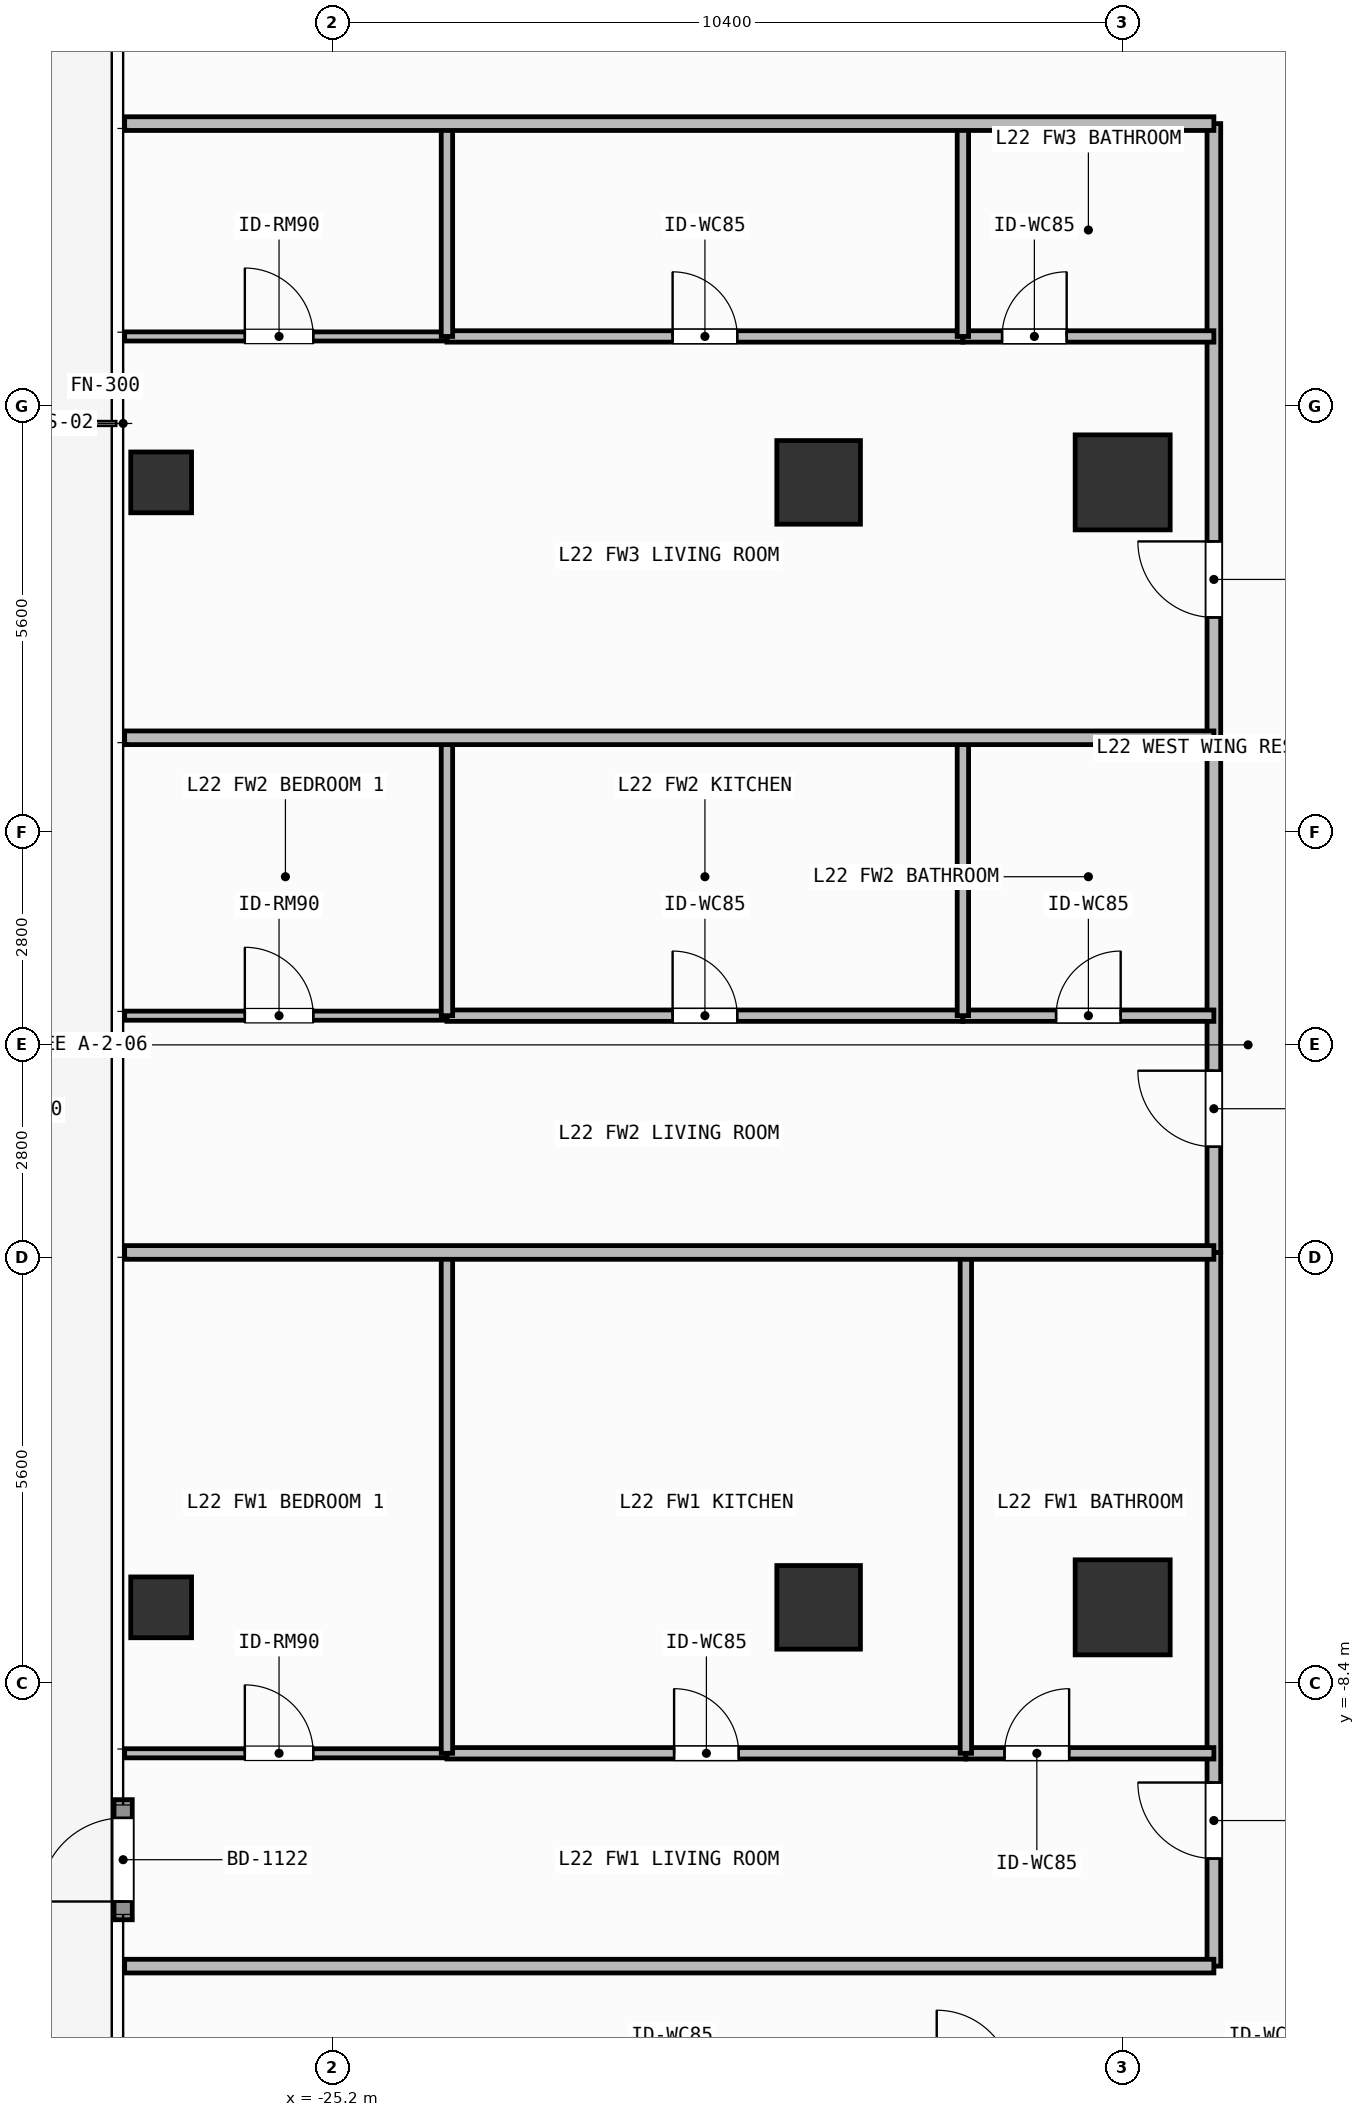
"""IFC4 building model, lengths in metres.
Left out: names, types, materials, properties, quantities, classifications, styles, units other than length and angle.
Written with IfcOpenShell. Run it as: python <this file> out.ifc"""

import sys

from ifc_helpers import new_model, si_unit, direction, frame, frame_2d, origin, origin_2d, place, context, subcontext, project, spatial, rectangle, hollow_rectangle, extrude, element, fill, save


model = new_model("IFC4")
c1 = context("Model", 3, precision=1e-05, world=origin(), true_north=direction((0.0, 1.0)))
c2 = subcontext(c1, "Body", "Model", "MODEL_VIEW")
j1 = project(units=[si_unit("LENGTHUNIT", "METRE"), si_unit("PLANEANGLEUNIT", "RADIAN")], contexts=[c1])
p1 = place(None, origin())
s1 = spatial("IfcSite", under=j1, at=p1, CompositionType="ELEMENT")
p2 = place(p1, origin())
s2 = spatial("IfcBuilding", under=s1, at=p2, CompositionType="ELEMENT")
p3 = place(p2, frame((0.0, 0.0, 89.1)))
s3 = spatial("IfcBuildingStorey", under=s2, at=p3, CompositionType="ELEMENT", Elevation=89.1)
for number, where, z_axis, x_axis in (
    (1, (-14.8, -7.4, 0.0), (0.0, 0.0, 1.0), (1.0, 0.0, 0.0)),
    (2, (-14.8, 7.4, 0.0), (0.0, 0.0, 1.0), (1.0, 0.0, 0.0)),
):
    element("IfcColumn", number, at=place(p3, frame(where, z_axis=z_axis, x_axis=x_axis)), inside=s3, PredefinedType="COLUMN", context=c2, shape_type="SweptSolid", body=[
        extrude(rectangle(XDim=1.25, YDim=1.25, at=origin_2d()), origin(), (0.0, 0.0, 1.0), 3.9),
    ])
for number, where, z_axis, x_axis in (
    (3, (-18.8, -7.4, 0.0), (0.0, 0.0, 1.0), (1.0, 0.0, 0.0)),
    (4, (-18.8, 7.4, 0.0), (0.0, 0.0, 1.0), (1.0, 0.0, 0.0)),
):
    element("IfcColumn", number, at=place(p3, frame(where, z_axis=z_axis, x_axis=x_axis)), inside=s3, PredefinedType="COLUMN", context=c2, shape_type="SweptSolid", body=[
        extrude(rectangle(XDim=1.1, YDim=1.1, at=origin_2d()), origin(), (0.0, 0.0, 1.0), 3.9),
    ])
for number, where, z_axis, x_axis in (
    (5, (-27.45, -7.4, 0.0), (0.0, 0.0, 1.0), (1.0, 0.0, 0.0)),
    (6, (-27.45, 7.4, 0.0), (0.0, 0.0, 1.0), (1.0, 0.0, 0.0)),
):
    element("IfcColumn", number, at=place(p3, frame(where, z_axis=z_axis, x_axis=x_axis)), inside=s3, PredefinedType="COLUMN", context=c2, shape_type="SweptSolid", body=[
        extrude(hollow_rectangle(XDim=0.8, YDim=0.8, WallThickness=0.036, at=origin_2d()), origin(), (0.0, 0.0, 1.0), 3.9),
    ])
p4 = place(p3, frame((-27.95, -11.51, 0.0), z_axis=(0.0, 0.0, 1.0), x_axis=(0.0, 1.0, 0.0)))
e7 = element("IfcWall", 7, at=p4, inside=s3, PredefinedType="SOLIDWALL", context=c2, shape_type="SweptSolid", body=[
    extrude(rectangle(XDim=1.58, YDim=0.24, at=frame_2d((0.79, 0.0))), origin(), (0.0, 0.0, 1.0), 3.68),
])
p5 = place(p4, frame((0.24, 0.0, 0.0)))
e8 = element("IfcOpeningElement", 8, at=p5, cuts=e7, PredefinedType="OPENING", context=c2, shape_type="SweptSolid", body=[
    extrude(rectangle(XDim=1.1, YDim=2.2, at=frame_2d((0.55, 1.1))), frame((0.0, 0.13, 0.0), z_axis=(0.0, -1.0, 0.0), x_axis=(1.0, 0.0, 0.0)), (0.0, 0.0, 1.0), 0.26),
])
p6 = place(p3, frame((-13.6, -12.12, 0.0), z_axis=(0.0, 0.0, 1.0), x_axis=(0.0, 1.0, 0.0)))
e9 = element("IfcWall", 9, at=p6, inside=s3, PredefinedType="PARTITIONING", context=c2, shape_type="SweptSolid", body=[
    extrude(rectangle(XDim=9.389, YDim=0.18, at=frame_2d((4.695, 0.0))), origin(), (0.0, 0.0, 1.0), 3.68),
])
p7 = place(p6, frame((1.415, 0.0, 0.0)))
e10 = element("IfcOpeningElement", 10, at=p7, cuts=e9, PredefinedType="OPENING", context=c2, shape_type="SweptSolid", body=[
    extrude(rectangle(XDim=1.0, YDim=2.2, at=frame_2d((0.5, 1.1))), frame((0.0, 0.1, 0.0), z_axis=(0.0, -1.0, 0.0), x_axis=(1.0, 0.0, 0.0)), (0.0, 0.0, 1.0), 0.2),
])
p8 = place(p3, frame((-23.69, -9.32, 0.0), z_axis=(0.0, 0.0, 1.0), x_axis=(1.0, 0.0, 0.0)))
e11 = element("IfcWall", 11, at=p8, inside=s3, PredefinedType="PARTITIONING", context=c2, shape_type="SweptSolid", body=[
    extrude(rectangle(XDim=6.827, YDim=0.15, at=frame_2d((3.414, 0.0))), origin(), (0.0, 0.0, 1.0), 3.68),
])
p9 = place(p8, frame((2.989, 0.0, 0.0)))
e12 = element("IfcOpeningElement", 12, at=p9, cuts=e11, PredefinedType="OPENING", context=c2, shape_type="SweptSolid", body=[
    extrude(rectangle(XDim=0.85, YDim=2.1, at=frame_2d((0.425, 1.05))), frame((0.0, 0.085, 0.0), z_axis=(0.0, -1.0, 0.0), x_axis=(1.0, 0.0, 0.0)), (0.0, 0.0, 1.0), 0.17),
])
p10 = place(p3, frame((-16.863, -9.32, 0.0), z_axis=(0.0, 0.0, 1.0), x_axis=(1.0, 0.0, 0.0)))
e13 = element("IfcWall", 13, at=p10, inside=s3, PredefinedType="PARTITIONING", context=c2, shape_type="SweptSolid", body=[
    extrude(rectangle(XDim=3.263, YDim=0.15, at=frame_2d((1.631, 0.0))), origin(), (0.0, 0.0, 1.0), 3.68),
])
p11 = place(p10, frame((0.509, 0.0, 0.0)))
e14 = element("IfcOpeningElement", 14, at=p11, cuts=e13, PredefinedType="OPENING", context=c2, shape_type="SweptSolid", body=[
    extrude(rectangle(XDim=0.85, YDim=2.1, at=frame_2d((0.425, 1.05))), frame((0.0, 0.085, 0.0), z_axis=(0.0, -1.0, 0.0), x_axis=(1.0, 0.0, 0.0)), (0.0, 0.0, 1.0), 0.17),
])
p12 = place(p3, frame((-27.93, -9.32, 0.0), z_axis=(0.0, 0.0, 1.0), x_axis=(1.0, 0.0, 0.0)))
e15 = element("IfcWall", 15, at=p12, inside=s3, PredefinedType="PARTITIONING", context=c2, shape_type="SweptSolid", body=[
    extrude(rectangle(XDim=4.24, YDim=0.12, at=frame_2d((2.12, 0.0))), origin(), (0.0, 0.0, 1.0), 3.68),
])
p13 = place(p12, frame((1.581, 0.0, 0.0)))
e16 = element("IfcOpeningElement", 16, at=p13, cuts=e15, PredefinedType="OPENING", context=c2, shape_type="SweptSolid", body=[
    extrude(rectangle(XDim=0.9, YDim=2.1, at=frame_2d((0.45, 1.05))), frame((0.0, 0.07, 0.0), z_axis=(0.0, -1.0, 0.0), x_axis=(1.0, 0.0, 0.0)), (0.0, 0.0, 1.0), 0.14),
])
p14 = place(p3, frame((-13.6, -2.731, 0.0), z_axis=(0.0, 0.0, 1.0), x_axis=(0.0, 1.0, 0.0)))
e17 = element("IfcWall", 17, at=p14, inside=s3, PredefinedType="PARTITIONING", context=c2, shape_type="SweptSolid", body=[
    extrude(rectangle(XDim=6.771, YDim=0.18, at=frame_2d((3.385, 0.0))), origin(), (0.0, 0.0, 1.0), 3.68),
])
p15 = place(p14, frame((1.391, 0.0, 0.0)))
e18 = element("IfcOpeningElement", 18, at=p15, cuts=e17, PredefinedType="OPENING", context=c2, shape_type="SweptSolid", body=[
    extrude(rectangle(XDim=1.0, YDim=2.2, at=frame_2d((0.5, 1.1))), frame((0.0, 0.1, 0.0), z_axis=(0.0, -1.0, 0.0), x_axis=(1.0, 0.0, 0.0)), (0.0, 0.0, 1.0), 0.2),
])
p16 = place(p3, frame((-23.69, 0.384, 0.0), z_axis=(0.0, 0.0, 1.0), x_axis=(1.0, 0.0, 0.0)))
e19 = element("IfcWall", 19, at=p16, inside=s3, PredefinedType="PARTITIONING", context=c2, shape_type="SweptSolid", body=[
    extrude(rectangle(XDim=6.788, YDim=0.15, at=frame_2d((3.394, 0.0))), origin(), (0.0, 0.0, 1.0), 3.68),
])
p17 = place(p16, frame((2.969, 0.0, 0.0)))
e20 = element("IfcOpeningElement", 20, at=p17, cuts=e19, PredefinedType="OPENING", context=c2, shape_type="SweptSolid", body=[
    extrude(rectangle(XDim=0.85, YDim=2.1, at=frame_2d((0.425, 1.05))), frame((0.0, 0.085, 0.0), z_axis=(0.0, -1.0, 0.0), x_axis=(1.0, 0.0, 0.0)), (0.0, 0.0, 1.0), 0.17),
])
p18 = place(p3, frame((-16.902, 0.384, 0.0), z_axis=(0.0, 0.0, 1.0), x_axis=(1.0, 0.0, 0.0)))
e21 = element("IfcWall", 21, at=p18, inside=s3, PredefinedType="PARTITIONING", context=c2, shape_type="SweptSolid", body=[
    extrude(rectangle(XDim=3.302, YDim=0.15, at=frame_2d((1.651, 0.0))), origin(), (0.0, 0.0, 1.0), 3.68),
])
p19 = place(p18, frame((1.226, 0.0, 0.0)))
e22 = element("IfcOpeningElement", 22, at=p19, cuts=e21, PredefinedType="OPENING", context=c2, shape_type="SweptSolid", body=[
    extrude(rectangle(XDim=0.85, YDim=2.1, at=frame_2d((0.425, 1.05))), frame((0.0, 0.085, 0.0), z_axis=(0.0, -1.0, 0.0), x_axis=(1.0, 0.0, 0.0)), (0.0, 0.0, 1.0), 0.17),
])
p20 = place(p3, frame((-27.93, 0.384, 0.0), z_axis=(0.0, 0.0, 1.0), x_axis=(1.0, 0.0, 0.0)))
e23 = element("IfcWall", 23, at=p20, inside=s3, PredefinedType="PARTITIONING", context=c2, shape_type="SweptSolid", body=[
    extrude(rectangle(XDim=4.24, YDim=0.12, at=frame_2d((2.12, 0.0))), origin(), (0.0, 0.0, 1.0), 3.68),
])
p21 = place(p20, frame((1.581, 0.0, 0.0)))
e24 = element("IfcOpeningElement", 24, at=p21, cuts=e23, PredefinedType="OPENING", context=c2, shape_type="SweptSolid", body=[
    extrude(rectangle(XDim=0.9, YDim=2.1, at=frame_2d((0.45, 1.05))), frame((0.0, 0.07, 0.0), z_axis=(0.0, -1.0, 0.0), x_axis=(1.0, 0.0, 0.0)), (0.0, 0.0, 1.0), 0.14),
])
p22 = place(p3, frame((-13.6, 4.04, 0.0), z_axis=(0.0, 0.0, 1.0), x_axis=(0.0, 1.0, 0.0)))
e25 = element("IfcWall", 25, at=p22, inside=s3, PredefinedType="PARTITIONING", context=c2, shape_type="SweptSolid", body=[
    extrude(rectangle(XDim=8.08, YDim=0.18, at=frame_2d((4.04, 0.0))), origin(), (0.0, 0.0, 1.0), 3.68),
])
p23 = place(p22, frame((1.583, 0.0, 0.0)))
e26 = element("IfcOpeningElement", 26, at=p23, cuts=e25, PredefinedType="OPENING", context=c2, shape_type="SweptSolid", body=[
    extrude(rectangle(XDim=1.0, YDim=2.2, at=frame_2d((0.5, 1.1))), frame((0.0, 0.1, 0.0), z_axis=(0.0, -1.0, 0.0), x_axis=(1.0, 0.0, 0.0)), (0.0, 0.0, 1.0), 0.2),
])
p24 = place(p3, frame((-23.69, 9.32, 0.0), z_axis=(0.0, 0.0, 1.0), x_axis=(1.0, 0.0, 0.0)))
e27 = element("IfcWall", 27, at=p24, inside=s3, PredefinedType="PARTITIONING", context=c2, shape_type="SweptSolid", body=[
    extrude(rectangle(XDim=6.788, YDim=0.15, at=frame_2d((3.394, 0.0))), origin(), (0.0, 0.0, 1.0), 3.68),
])
p25 = place(p24, frame((2.969, 0.0, 0.0)))
e28 = element("IfcOpeningElement", 28, at=p25, cuts=e27, PredefinedType="OPENING", context=c2, shape_type="SweptSolid", body=[
    extrude(rectangle(XDim=0.85, YDim=2.1, at=frame_2d((0.425, 1.05))), frame((0.0, 0.085, 0.0), z_axis=(0.0, -1.0, 0.0), x_axis=(1.0, 0.0, 0.0)), (0.0, 0.0, 1.0), 0.17),
])
p26 = place(p3, frame((-16.902, 9.32, 0.0), z_axis=(0.0, 0.0, 1.0), x_axis=(1.0, 0.0, 0.0)))
e29 = element("IfcWall", 29, at=p26, inside=s3, PredefinedType="PARTITIONING", context=c2, shape_type="SweptSolid", body=[
    extrude(rectangle(XDim=3.302, YDim=0.15, at=frame_2d((1.651, 0.0))), origin(), (0.0, 0.0, 1.0), 3.68),
])
p27 = place(p26, frame((0.515, 0.0, 0.0)))
e30 = element("IfcOpeningElement", 30, at=p27, cuts=e29, PredefinedType="OPENING", context=c2, shape_type="SweptSolid", body=[
    extrude(rectangle(XDim=0.85, YDim=2.1, at=frame_2d((0.425, 1.05))), frame((0.0, 0.085, 0.0), z_axis=(0.0, -1.0, 0.0), x_axis=(1.0, 0.0, 0.0)), (0.0, 0.0, 1.0), 0.17),
])
p28 = place(p3, frame((-27.93, 9.32, 0.0), z_axis=(0.0, 0.0, 1.0), x_axis=(1.0, 0.0, 0.0)))
e31 = element("IfcWall", 31, at=p28, inside=s3, PredefinedType="PARTITIONING", context=c2, shape_type="SweptSolid", body=[
    extrude(rectangle(XDim=4.24, YDim=0.12, at=frame_2d((2.12, 0.0))), origin(), (0.0, 0.0, 1.0), 3.68),
])
p29 = place(p28, frame((1.581, 0.0, 0.0)))
e32 = element("IfcOpeningElement", 32, at=p29, cuts=e31, PredefinedType="OPENING", context=c2, shape_type="SweptSolid", body=[
    extrude(rectangle(XDim=0.9, YDim=2.1, at=frame_2d((0.45, 1.05))), frame((0.0, 0.07, 0.0), z_axis=(0.0, -1.0, 0.0), x_axis=(1.0, 0.0, 0.0)), (0.0, 0.0, 1.0), 0.14),
])
for number, where, z_axis, x_axis in (
    (33, (-16.863, -9.32, 0.0), (0.0, 0.0, 1.0), (0.0, 1.0, 0.0)),
    (34, (-23.69, -9.32, 0.0), (0.0, 0.0, 1.0), (0.0, 1.0, 0.0)),
):
    element("IfcWall", number, at=place(p3, frame(where, z_axis=z_axis, x_axis=x_axis)), inside=s3, PredefinedType="PARTITIONING", context=c2, shape_type="SweptSolid", body=[
        extrude(rectangle(XDim=6.589, YDim=0.15, at=frame_2d((3.294, 0.0))), origin(), (0.0, 0.0, 1.0), 3.68),
    ])
for number, where, z_axis, x_axis in (
    (35, (-16.902, 0.384, 0.0), (0.0, 0.0, 1.0), (0.0, 1.0, 0.0)),
    (36, (-23.69, 0.384, 0.0), (0.0, 0.0, 1.0), (0.0, 1.0, 0.0)),
):
    element("IfcWall", number, at=place(p3, frame(where, z_axis=z_axis, x_axis=x_axis)), inside=s3, PredefinedType="PARTITIONING", context=c2, shape_type="SweptSolid", body=[
        extrude(rectangle(XDim=3.656, YDim=0.15, at=frame_2d((1.828, 0.0))), origin(), (0.0, 0.0, 1.0), 3.68),
    ])
p30 = place(p3, frame((-27.93, -2.731, 0.0), z_axis=(0.0, 0.0, 1.0), x_axis=(1.0, 0.0, 0.0)))
e37 = element("IfcWall", 37, at=p30, inside=s3, PredefinedType="PARTITIONING", context=c2, shape_type="SweptSolid", body=[
    extrude(rectangle(XDim=14.33, YDim=0.18, at=frame_2d((7.165, 0.0))), origin(), (0.0, 0.0, 1.0), 3.68),
])
for number, where, z_axis, x_axis in (
    (38, (-16.902, 9.32, 0.0), (0.0, 0.0, 1.0), (0.0, 1.0, 0.0)),
    (39, (-23.69, 9.32, 0.0), (0.0, 0.0, 1.0), (0.0, 1.0, 0.0)),
):
    element("IfcWall", number, at=place(p3, frame(where, z_axis=z_axis, x_axis=x_axis)), inside=s3, PredefinedType="PARTITIONING", context=c2, shape_type="SweptSolid", body=[
        extrude(rectangle(XDim=2.8, YDim=0.15, at=frame_2d((1.4, 0.0))), origin(), (0.0, 0.0, 1.0), 3.68),
    ])
for number, where, z_axis, x_axis in (
    (40, (-27.93, 4.04, 0.0), (0.0, 0.0, 1.0), (1.0, 0.0, 0.0)),
    (41, (-27.93, -12.12, 0.0), (0.0, 0.0, 1.0), (1.0, 0.0, 0.0)),
    (42, (-27.93, 12.12, 0.0), (0.0, 0.0, 1.0), (1.0, 0.0, 0.0)),
):
    element("IfcWall", number, at=place(p3, frame(where, z_axis=z_axis, x_axis=x_axis)), inside=s3, PredefinedType="PARTITIONING", context=c2, shape_type="SweptSolid", body=[
        extrude(rectangle(XDim=14.33, YDim=0.18, at=frame_2d((7.165, 0.0))), origin(), (0.0, 0.0, 1.0), 3.68),
    ])
p31 = place(p5, origin())
e43 = element("IfcDoor", 43, at=p31, inside=s3, OperationType="SINGLE_SWING_LEFT", PredefinedType="DOOR", context=c2, shape_type="SweptSolid", body=[
    extrude(rectangle(XDim=1.1, YDim=2.2, at=frame_2d((0.55, 1.1))), frame((0.0, 0.025, 0.0), z_axis=(0.0, -1.0, 0.0), x_axis=(1.0, 0.0, 0.0)), (0.0, 0.0, 1.0), 0.05),
])
fill(e8, e43)
p32 = place(p7, origin())
e44 = element("IfcDoor", 44, at=p32, inside=s3, OperationType="SINGLE_SWING_RIGHT", PredefinedType="DOOR", context=c2, shape_type="SweptSolid", body=[
    extrude(rectangle(XDim=1.0, YDim=2.2, at=frame_2d((0.5, 1.1))), frame((0.0, 0.025, 0.0), z_axis=(0.0, -1.0, 0.0), x_axis=(1.0, 0.0, 0.0)), (0.0, 0.0, 1.0), 0.05),
])
fill(e10, e44)
p33 = place(p9, origin())
e45 = element("IfcDoor", 45, at=p33, inside=s3, OperationType="SINGLE_SWING_LEFT", PredefinedType="DOOR", context=c2, shape_type="SweptSolid", body=[
    extrude(rectangle(XDim=0.85, YDim=2.1, at=frame_2d((0.425, 1.05))), frame((0.0, 0.025, 0.0), z_axis=(0.0, -1.0, 0.0), x_axis=(1.0, 0.0, 0.0)), (0.0, 0.0, 1.0), 0.05),
])
fill(e12, e45)
p34 = place(p11, origin())
e46 = element("IfcDoor", 46, at=p34, inside=s3, OperationType="SINGLE_SWING_RIGHT", PredefinedType="DOOR", context=c2, shape_type="SweptSolid", body=[
    extrude(rectangle(XDim=0.85, YDim=2.1, at=frame_2d((0.425, 1.05))), frame((0.0, 0.025, 0.0), z_axis=(0.0, -1.0, 0.0), x_axis=(1.0, 0.0, 0.0)), (0.0, 0.0, 1.0), 0.05),
])
fill(e14, e46)
p35 = place(p13, origin())
e47 = element("IfcDoor", 47, at=p35, inside=s3, OperationType="SINGLE_SWING_LEFT", PredefinedType="DOOR", context=c2, shape_type="SweptSolid", body=[
    extrude(rectangle(XDim=0.9, YDim=2.1, at=frame_2d((0.45, 1.05))), frame((0.0, 0.025, 0.0), z_axis=(0.0, -1.0, 0.0), x_axis=(1.0, 0.0, 0.0)), (0.0, 0.0, 1.0), 0.05),
])
fill(e16, e47)
p36 = place(p15, origin())
e48 = element("IfcDoor", 48, at=p36, inside=s3, OperationType="SINGLE_SWING_RIGHT", PredefinedType="DOOR", context=c2, shape_type="SweptSolid", body=[
    extrude(rectangle(XDim=1.0, YDim=2.2, at=frame_2d((0.5, 1.1))), frame((0.0, 0.025, 0.0), z_axis=(0.0, -1.0, 0.0), x_axis=(1.0, 0.0, 0.0)), (0.0, 0.0, 1.0), 0.05),
])
fill(e18, e48)
p37 = place(p17, origin())
e49 = element("IfcDoor", 49, at=p37, inside=s3, OperationType="SINGLE_SWING_LEFT", PredefinedType="DOOR", context=c2, shape_type="SweptSolid", body=[
    extrude(rectangle(XDim=0.85, YDim=2.1, at=frame_2d((0.425, 1.05))), frame((0.0, 0.025, 0.0), z_axis=(0.0, -1.0, 0.0), x_axis=(1.0, 0.0, 0.0)), (0.0, 0.0, 1.0), 0.05),
])
fill(e20, e49)
p38 = place(p19, origin())
e50 = element("IfcDoor", 50, at=p38, inside=s3, OperationType="SINGLE_SWING_RIGHT", PredefinedType="DOOR", context=c2, shape_type="SweptSolid", body=[
    extrude(rectangle(XDim=0.85, YDim=2.1, at=frame_2d((0.425, 1.05))), frame((0.0, 0.025, 0.0), z_axis=(0.0, -1.0, 0.0), x_axis=(1.0, 0.0, 0.0)), (0.0, 0.0, 1.0), 0.05),
])
fill(e22, e50)
p39 = place(p21, origin())
e51 = element("IfcDoor", 51, at=p39, inside=s3, OperationType="SINGLE_SWING_LEFT", PredefinedType="DOOR", context=c2, shape_type="SweptSolid", body=[
    extrude(rectangle(XDim=0.9, YDim=2.1, at=frame_2d((0.45, 1.05))), frame((0.0, 0.025, 0.0), z_axis=(0.0, -1.0, 0.0), x_axis=(1.0, 0.0, 0.0)), (0.0, 0.0, 1.0), 0.05),
])
fill(e24, e51)
p40 = place(p23, origin())
e52 = element("IfcDoor", 52, at=p40, inside=s3, OperationType="SINGLE_SWING_RIGHT", PredefinedType="DOOR", context=c2, shape_type="SweptSolid", body=[
    extrude(rectangle(XDim=1.0, YDim=2.2, at=frame_2d((0.5, 1.1))), frame((0.0, 0.025, 0.0), z_axis=(0.0, -1.0, 0.0), x_axis=(1.0, 0.0, 0.0)), (0.0, 0.0, 1.0), 0.05),
])
fill(e26, e52)
p41 = place(p25, origin())
e53 = element("IfcDoor", 53, at=p41, inside=s3, OperationType="SINGLE_SWING_LEFT", PredefinedType="DOOR", context=c2, shape_type="SweptSolid", body=[
    extrude(rectangle(XDim=0.85, YDim=2.1, at=frame_2d((0.425, 1.05))), frame((0.0, 0.025, 0.0), z_axis=(0.0, -1.0, 0.0), x_axis=(1.0, 0.0, 0.0)), (0.0, 0.0, 1.0), 0.05),
])
fill(e28, e53)
p42 = place(p27, origin())
e54 = element("IfcDoor", 54, at=p42, inside=s3, OperationType="SINGLE_SWING_RIGHT", PredefinedType="DOOR", context=c2, shape_type="SweptSolid", body=[
    extrude(rectangle(XDim=0.85, YDim=2.1, at=frame_2d((0.425, 1.05))), frame((0.0, 0.025, 0.0), z_axis=(0.0, -1.0, 0.0), x_axis=(1.0, 0.0, 0.0)), (0.0, 0.0, 1.0), 0.05),
])
fill(e30, e54)
p43 = place(p29, origin())
e55 = element("IfcDoor", 55, at=p43, inside=s3, OperationType="SINGLE_SWING_LEFT", PredefinedType="DOOR", context=c2, shape_type="SweptSolid", body=[
    extrude(rectangle(XDim=0.9, YDim=2.1, at=frame_2d((0.45, 1.05))), frame((0.0, 0.025, 0.0), z_axis=(0.0, -1.0, 0.0), x_axis=(1.0, 0.0, 0.0)), (0.0, 0.0, 1.0), 0.05),
])
fill(e32, e55)
save(model, sys.argv[1])
